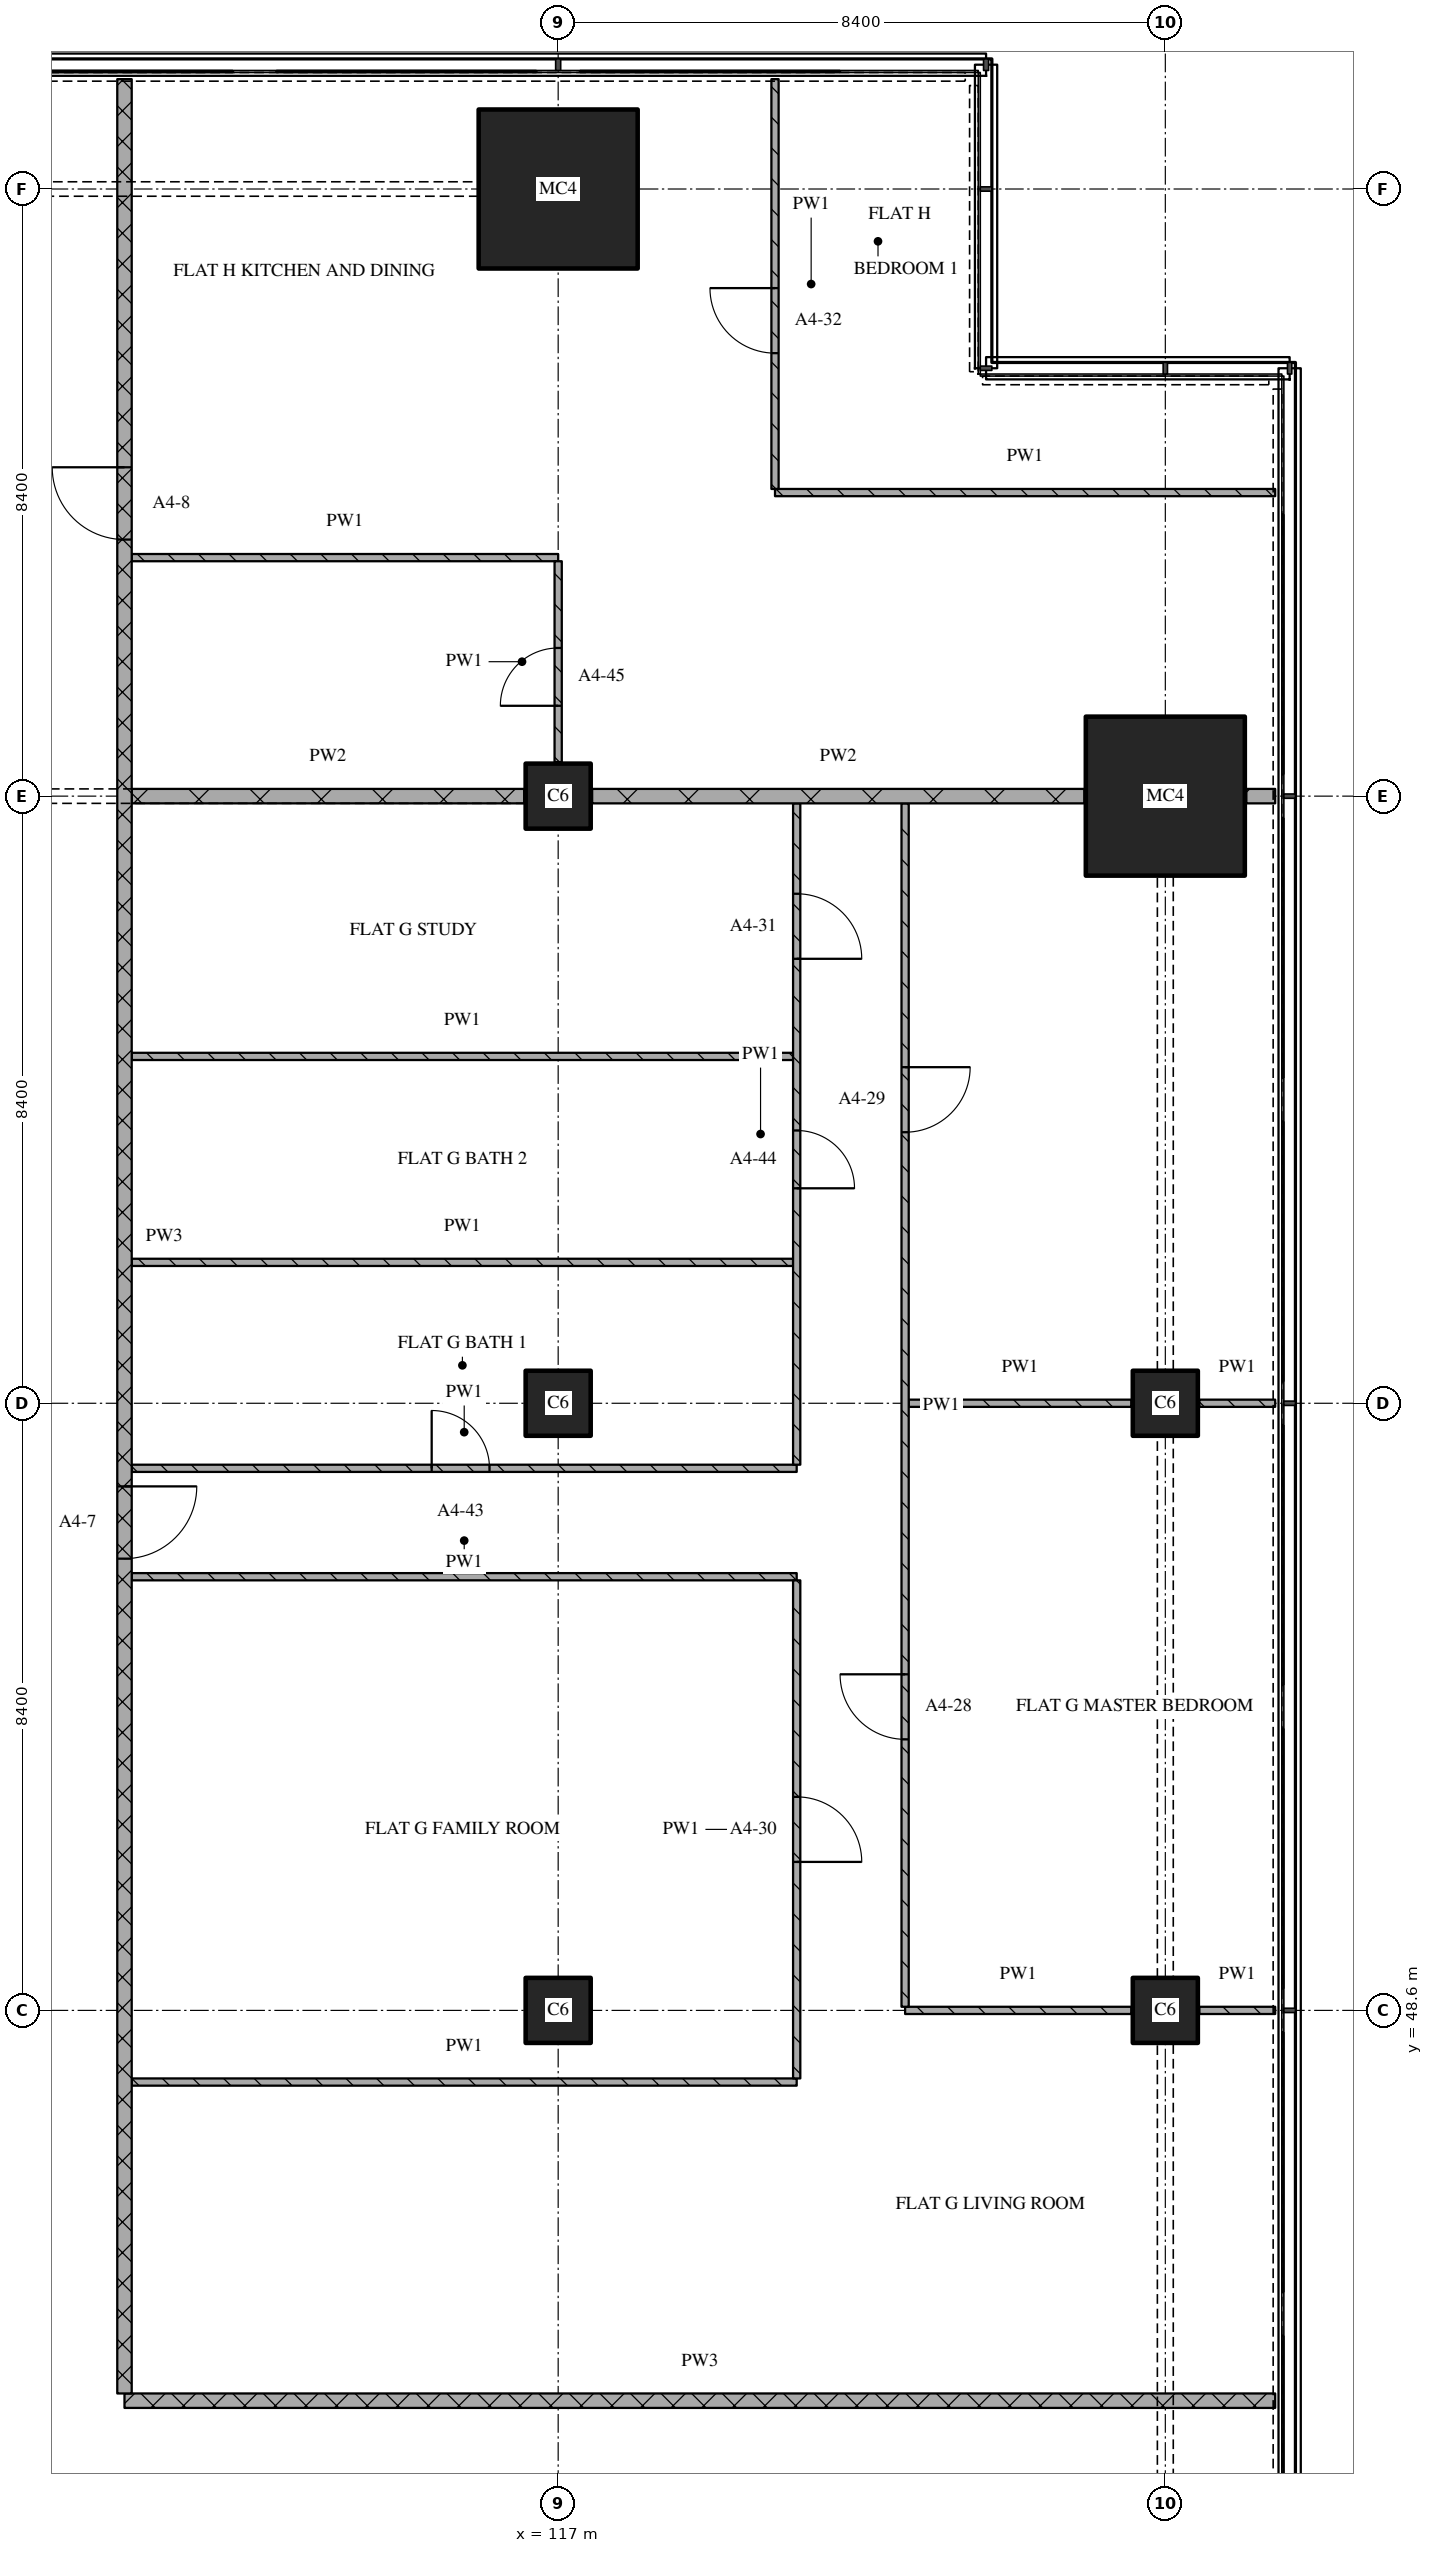
"""IFC4 building model, lengths in metres.
Left out: names, types, materials, properties, quantities, classifications, styles, units other than length and angle.
Written with IfcOpenShell. Run it as: python <this file> out.ifc"""

import sys

from ifc_helpers import new_model, si_unit, direction, frame, frame_2d, origin, origin_2d, place, context, subcontext, project, spatial, rectangle, extrude, element, fill, save


model = new_model("IFC4")
c1 = context("Model", 3, precision=1e-05, world=origin(), true_north=direction((0.0, 1.0)))
c2 = subcontext(c1, "Body", "Model", "MODEL_VIEW")
j1 = project(units=[si_unit("LENGTHUNIT", "METRE"), si_unit("PLANEANGLEUNIT", "RADIAN")], contexts=[c1])
p1 = place(None, origin())
s1 = spatial("IfcSite", under=j1, at=p1, CompositionType="ELEMENT")
p2 = place(p1, origin())
s2 = spatial("IfcBuilding", under=s1, at=p2, CompositionType="ELEMENT")
p3 = place(p2, frame((0.0, 0.0, 73.2)))
s3 = spatial("IfcBuildingStorey", under=s2, at=p3, CompositionType="ELEMENT", Elevation=73.2)
for number, where, z_axis, x_axis in (
    (1, (117.0, 48.6, 0.0), (0.0, 0.0, 1.0), (1.0, 0.0, 0.0)),
    (2, (117.0, 57.0, 0.0), (0.0, 0.0, 1.0), (1.0, 0.0, 0.0)),
    (3, (117.0, 65.4, 0.0), (0.0, 0.0, 1.0), (1.0, 0.0, 0.0)),
):
    element("IfcColumn", number, at=place(p3, frame(where, z_axis=z_axis, x_axis=x_axis)), inside=s3, PredefinedType="COLUMN", context=c2, shape_type="SweptSolid", body=[
        extrude(rectangle(XDim=0.9, YDim=0.9, at=origin_2d()), origin(), (0.0, 0.0, 1.0), 3.6),
    ])
p4 = place(p3, frame((117.0, 73.8, 0.0), z_axis=(0.0, 0.0, 1.0), x_axis=(1.0, 0.0, 0.0)))
e4 = element("IfcColumn", 4, at=p4, inside=s3, PredefinedType="COLUMN", context=c2, shape_type="SweptSolid", body=[
    extrude(rectangle(XDim=2.2, YDim=2.2, at=origin_2d()), origin(), (0.0, 0.0, 1.0), 3.6),
])
for number, where, z_axis, x_axis in (
    (5, (125.4, 48.6, 0.0), (0.0, 0.0, 1.0), (1.0, 0.0, 0.0)),
    (6, (125.4, 57.0, 0.0), (0.0, 0.0, 1.0), (1.0, 0.0, 0.0)),
):
    element("IfcColumn", number, at=place(p3, frame(where, z_axis=z_axis, x_axis=x_axis)), inside=s3, PredefinedType="COLUMN", context=c2, shape_type="SweptSolid", body=[
        extrude(rectangle(XDim=0.9, YDim=0.9, at=origin_2d()), origin(), (0.0, 0.0, 1.0), 3.6),
    ])
p5 = place(p3, frame((125.4, 65.4, 0.0), z_axis=(0.0, 0.0, 1.0), x_axis=(1.0, 0.0, 0.0)))
e7 = element("IfcColumn", 7, at=p5, inside=s3, PredefinedType="COLUMN", context=c2, shape_type="SweptSolid", body=[
    extrude(rectangle(XDim=2.2, YDim=2.2, at=origin_2d()), origin(), (0.0, 0.0, 1.0), 3.6),
])
p6 = place(p3, frame((111.0, 43.2, 0.0), z_axis=(0.0, 0.0, 1.0), x_axis=(1.0, 0.0, 0.0)))
e8 = element("IfcWall", 8, at=p6, inside=s3, PredefinedType="PARTITIONING", context=c2, shape_type="SweptSolid", body=[
    extrude(rectangle(XDim=15.92, YDim=0.2, at=frame_2d((7.96, 0.0))), origin(), (0.0, 0.0, 1.0), 3.32),
])
p7 = place(p3, frame((111.1, 47.609, 0.0), z_axis=(0.0, 0.0, 1.0), x_axis=(1.0, 0.0, 0.0)))
e9 = element("IfcWall", 9, at=p7, inside=s3, PredefinedType="PARTITIONING", context=c2, shape_type="SweptSolid", body=[
    extrude(rectangle(XDim=9.2, YDim=0.1, at=frame_2d((4.6, 0.0))), origin(), (0.0, 0.0, 1.0), 3.32),
])
p8 = place(p3, frame((121.8, 48.6, 0.0), z_axis=(0.0, 0.0, 1.0), x_axis=(1.0, 0.0, 0.0)))
e10 = element("IfcWall", 10, at=p8, inside=s3, PredefinedType="PARTITIONING", context=c2, shape_type="SweptSolid", body=[
    extrude(rectangle(XDim=3.13, YDim=0.1, at=frame_2d((1.565, 0.0))), origin(), (0.0, 0.0, 1.0), 3.32),
])
p9 = place(p3, frame((125.87, 48.6, 0.0), z_axis=(0.0, 0.0, 1.0), x_axis=(1.0, 0.0, 0.0)))
e11 = element("IfcWall", 11, at=p9, inside=s3, PredefinedType="PARTITIONING", context=c2, shape_type="SweptSolid", body=[
    extrude(rectangle(XDim=1.05, YDim=0.1, at=frame_2d((0.525, 0.0))), origin(), (0.0, 0.0, 1.0), 3.32),
])
p10 = place(p3, frame((111.1, 54.6, 0.0), z_axis=(0.0, 0.0, 1.0), x_axis=(1.0, 0.0, 0.0)))
e12 = element("IfcWall", 12, at=p10, inside=s3, PredefinedType="PARTITIONING", context=c2, shape_type="SweptSolid", body=[
    extrude(rectangle(XDim=9.2, YDim=0.1, at=frame_2d((4.6, 0.0))), origin(), (0.0, 0.0, 1.0), 3.32),
])
p11 = place(p3, frame((111.1, 56.1, 0.0), z_axis=(0.0, 0.0, 1.0), x_axis=(1.0, 0.0, 0.0)))
e13 = element("IfcWall", 13, at=p11, inside=s3, PredefinedType="PARTITIONING", context=c2, shape_type="SweptSolid", body=[
    extrude(rectangle(XDim=9.2, YDim=0.1, at=frame_2d((4.6, 0.0))), origin(), (0.0, 0.0, 1.0), 3.32),
])
p12 = place(p11, frame((4.15, 0.0, 0.0)))
e14 = element("IfcOpeningElement", 14, at=p12, cuts=e13, PredefinedType="OPENING", context=c2, shape_type="SweptSolid", body=[
    extrude(rectangle(XDim=0.8, YDim=2.1, at=frame_2d((0.4, 1.05))), frame((0.0, 0.06, 0.0), z_axis=(0.0, -1.0, 0.0), x_axis=(1.0, 0.0, 0.0)), (0.0, 0.0, 1.0), 0.12),
])
p13 = place(p3, frame((121.85, 57.0, 0.0), z_axis=(0.0, 0.0, 1.0), x_axis=(1.0, 0.0, 0.0)))
e15 = element("IfcWall", 15, at=p13, inside=s3, PredefinedType="PARTITIONING", context=c2, shape_type="SweptSolid", body=[
    extrude(rectangle(XDim=3.08, YDim=0.1, at=frame_2d((1.54, 0.0))), origin(), (0.0, 0.0, 1.0), 3.32),
])
p14 = place(p3, frame((125.87, 57.0, 0.0), z_axis=(0.0, 0.0, 1.0), x_axis=(1.0, 0.0, 0.0)))
e16 = element("IfcWall", 16, at=p14, inside=s3, PredefinedType="PARTITIONING", context=c2, shape_type="SweptSolid", body=[
    extrude(rectangle(XDim=1.05, YDim=0.1, at=frame_2d((0.525, 0.0))), origin(), (0.0, 0.0, 1.0), 3.32),
])
for number, where, z_axis, x_axis in (
    (17, (111.1, 58.949, 0.0), (0.0, 0.0, 1.0), (1.0, 0.0, 0.0)),
    (18, (111.1, 61.799, 0.0), (0.0, 0.0, 1.0), (1.0, 0.0, 0.0)),
):
    element("IfcWall", number, at=place(p3, frame(where, z_axis=z_axis, x_axis=x_axis)), inside=s3, PredefinedType="PARTITIONING", context=c2, shape_type="SweptSolid", body=[
        extrude(rectangle(XDim=9.15, YDim=0.1, at=frame_2d((4.575, 0.0))), origin(), (0.0, 0.0, 1.0), 3.32),
    ])
p15 = place(p3, frame((111.1, 65.4, 0.0), z_axis=(0.0, 0.0, 1.0), x_axis=(1.0, 0.0, 0.0)))
e19 = element("IfcWall", 19, at=p15, inside=s3, PredefinedType="PARTITIONING", context=c2, shape_type="SweptSolid", body=[
    extrude(rectangle(XDim=5.43, YDim=0.2, at=frame_2d((2.715, 0.0))), origin(), (0.0, 0.0, 1.0), 2.82),
])
p16 = place(p3, frame((117.47, 65.4, 0.0), z_axis=(0.0, 0.0, 1.0), x_axis=(1.0, 0.0, 0.0)))
e20 = element("IfcWall", 20, at=p16, inside=s3, PredefinedType="PARTITIONING", context=c2, shape_type="SweptSolid", body=[
    extrude(rectangle(XDim=6.81, YDim=0.2, at=frame_2d((3.405, 0.0))), origin(), (0.0, 0.0, 1.0), 3.32),
])
p17 = place(p3, frame((126.52, 65.4, 0.0), z_axis=(0.0, 0.0, 1.0), x_axis=(1.0, 0.0, 0.0)))
e21 = element("IfcWall", 21, at=p17, inside=s3, PredefinedType="PARTITIONING", context=c2, shape_type="SweptSolid", body=[
    extrude(rectangle(XDim=0.4, YDim=0.2, at=frame_2d((0.2, 0.0))), origin(), (0.0, 0.0, 1.0), 3.32),
])
p18 = place(p3, frame((111.1, 68.7, 0.0), z_axis=(0.0, 0.0, 1.0), x_axis=(1.0, 0.0, 0.0)))
e22 = element("IfcWall", 22, at=p18, inside=s3, PredefinedType="PARTITIONING", context=c2, shape_type="SweptSolid", body=[
    extrude(rectangle(XDim=5.9, YDim=0.1, at=frame_2d((2.95, 0.0))), origin(), (0.0, 0.0, 1.0), 3.32),
])
p19 = place(p3, frame((120.0, 69.6, 0.0), z_axis=(0.0, 0.0, 1.0), x_axis=(1.0, 0.0, 0.0)))
e23 = element("IfcWall", 23, at=p19, inside=s3, PredefinedType="PARTITIONING", context=c2, shape_type="SweptSolid", body=[
    extrude(rectangle(XDim=6.92, YDim=0.1, at=frame_2d((3.46, 0.0))), origin(), (0.0, 0.0, 1.0), 3.32),
])
p20 = place(p3, frame((111.0, 75.32, 0.0), z_axis=(0.0, 0.0, 1.0), x_axis=(0.0, -1.0, 0.0)))
e24 = element("IfcWall", 24, at=p20, inside=s3, PredefinedType="PARTITIONING", context=c2, shape_type="SweptSolid", body=[
    extrude(rectangle(XDim=32.02, YDim=0.2, at=frame_2d((16.01, 0.0))), origin(), (0.0, 0.0, 1.0), 3.32),
])
p21 = place(p20, frame((5.37, 0.0, 0.0)))
e25 = element("IfcOpeningElement", 25, at=p21, cuts=e24, PredefinedType="OPENING", context=c2, shape_type="SweptSolid", body=[
    extrude(rectangle(XDim=1.0, YDim=2.1, at=frame_2d((0.5, 1.05))), frame((0.0, 0.11, 0.0), z_axis=(0.0, -1.0, 0.0), x_axis=(1.0, 0.0, 0.0)), (0.0, 0.0, 1.0), 0.22),
])
p22 = place(p20, frame((19.47, 0.0, 0.0)))
e26 = element("IfcOpeningElement", 26, at=p22, cuts=e24, PredefinedType="OPENING", context=c2, shape_type="SweptSolid", body=[
    extrude(rectangle(XDim=1.0, YDim=2.1, at=frame_2d((0.5, 1.05))), frame((0.0, 0.11, 0.0), z_axis=(0.0, -1.0, 0.0), x_axis=(1.0, 0.0, 0.0)), (0.0, 0.0, 1.0), 0.22),
])
p23 = place(p3, frame((117.0, 65.87, 0.0), z_axis=(0.0, 0.0, 1.0), x_axis=(0.0, 1.0, 0.0)))
e27 = element("IfcWall", 27, at=p23, inside=s3, PredefinedType="PARTITIONING", context=c2, shape_type="SweptSolid", body=[
    extrude(rectangle(XDim=2.78, YDim=0.1, at=frame_2d((1.39, 0.0))), origin(), (0.0, 0.0, 1.0), 3.32),
])
p24 = place(p23, frame((0.78, 0.0, 0.0)))
e28 = element("IfcOpeningElement", 28, at=p24, cuts=e27, PredefinedType="OPENING", context=c2, shape_type="SweptSolid", body=[
    extrude(rectangle(XDim=0.8, YDim=2.1, at=frame_2d((0.4, 1.05))), frame((0.0, 0.06, 0.0), z_axis=(0.0, -1.0, 0.0), x_axis=(1.0, 0.0, 0.0)), (0.0, 0.0, 1.0), 0.12),
])
p25 = place(p3, frame((120.0, 75.32, 0.0), z_axis=(0.0, 0.0, 1.0), x_axis=(0.0, -1.0, 0.0)))
e29 = element("IfcWall", 29, at=p25, inside=s3, PredefinedType="PARTITIONING", context=c2, shape_type="SweptSolid", body=[
    extrude(rectangle(XDim=5.67, YDim=0.1, at=frame_2d((2.835, 0.0))), origin(), (0.0, 0.0, 1.0), 3.32),
])
p26 = place(p25, frame((2.891, 0.0, 0.0)))
e30 = element("IfcOpeningElement", 30, at=p26, cuts=e29, PredefinedType="OPENING", context=c2, shape_type="SweptSolid", body=[
    extrude(rectangle(XDim=0.9, YDim=2.1, at=frame_2d((0.45, 1.05))), frame((0.0, 0.06, 0.0), z_axis=(0.0, -1.0, 0.0), x_axis=(1.0, 0.0, 0.0)), (0.0, 0.0, 1.0), 0.12),
])
p27 = place(p3, frame((120.3, 47.659, 0.0), z_axis=(0.0, 0.0, 1.0), x_axis=(0.0, 1.0, 0.0)))
e31 = element("IfcWall", 31, at=p27, inside=s3, PredefinedType="PARTITIONING", context=c2, shape_type="SweptSolid", body=[
    extrude(rectangle(XDim=6.891, YDim=0.1, at=frame_2d((3.446, 0.0))), origin(), (0.0, 0.0, 1.0), 3.32),
])
p28 = place(p27, frame((2.996, 0.0, 0.0)))
e32 = element("IfcOpeningElement", 32, at=p28, cuts=e31, PredefinedType="OPENING", context=c2, shape_type="SweptSolid", body=[
    extrude(rectangle(XDim=0.9, YDim=2.1, at=frame_2d((0.45, 1.05))), frame((0.0, 0.06, 0.0), z_axis=(0.0, -1.0, 0.0), x_axis=(1.0, 0.0, 0.0)), (0.0, 0.0, 1.0), 0.12),
])
p29 = place(p3, frame((120.3, 56.15, 0.0), z_axis=(0.0, 0.0, 1.0), x_axis=(0.0, 1.0, 0.0)))
e33 = element("IfcWall", 33, at=p29, inside=s3, PredefinedType="PARTITIONING", context=c2, shape_type="SweptSolid", body=[
    extrude(rectangle(XDim=9.15, YDim=0.1, at=frame_2d((4.575, 0.0))), origin(), (0.0, 0.0, 1.0), 3.32),
])
p30 = place(p29, frame((3.824, 0.0, 0.0)))
e34 = element("IfcOpeningElement", 34, at=p30, cuts=e33, PredefinedType="OPENING", context=c2, shape_type="SweptSolid", body=[
    extrude(rectangle(XDim=0.8, YDim=2.1, at=frame_2d((0.4, 1.05))), frame((0.0, 0.06, 0.0), z_axis=(0.0, -1.0, 0.0), x_axis=(1.0, 0.0, 0.0)), (0.0, 0.0, 1.0), 0.12),
])
p31 = place(p29, frame((7.0, 0.0, 0.0)))
e35 = element("IfcOpeningElement", 35, at=p31, cuts=e33, PredefinedType="OPENING", context=c2, shape_type="SweptSolid", body=[
    extrude(rectangle(XDim=0.9, YDim=2.1, at=frame_2d((0.45, 1.05))), frame((0.0, 0.06, 0.0), z_axis=(0.0, -1.0, 0.0), x_axis=(1.0, 0.0, 0.0)), (0.0, 0.0, 1.0), 0.12),
])
p32 = place(p3, frame((121.8, 65.3, 0.0), z_axis=(0.0, 0.0, 1.0), x_axis=(0.0, -1.0, 0.0)))
e36 = element("IfcWall", 36, at=p32, inside=s3, PredefinedType="PARTITIONING", context=c2, shape_type="SweptSolid", body=[
    extrude(rectangle(XDim=16.65, YDim=0.1, at=frame_2d((8.325, 0.0))), origin(), (0.0, 0.0, 1.0), 3.32),
])
p33 = place(p32, frame((3.65, 0.0, 0.0)))
e37 = element("IfcOpeningElement", 37, at=p33, cuts=e36, PredefinedType="OPENING", context=c2, shape_type="SweptSolid", body=[
    extrude(rectangle(XDim=0.9, YDim=2.1, at=frame_2d((0.45, 1.05))), frame((0.0, 0.06, 0.0), z_axis=(0.0, -1.0, 0.0), x_axis=(1.0, 0.0, 0.0)), (0.0, 0.0, 1.0), 0.12),
])
p34 = place(p32, frame((12.05, 0.0, 0.0)))
e38 = element("IfcOpeningElement", 38, at=p34, cuts=e36, PredefinedType="OPENING", context=c2, shape_type="SweptSolid", body=[
    extrude(rectangle(XDim=0.9, YDim=2.1, at=frame_2d((0.45, 1.05))), frame((0.0, 0.06, 0.0), z_axis=(0.0, -1.0, 0.0), x_axis=(1.0, 0.0, 0.0)), (0.0, 0.0, 1.0), 0.12),
])
p35 = place(p12, origin())
e39 = element("IfcDoor", 39, at=p35, inside=s3, OperationType="SINGLE_SWING_LEFT", PredefinedType="DOOR", context=c2, shape_type="SweptSolid", body=[
    extrude(rectangle(XDim=0.8, YDim=2.1, at=frame_2d((0.4, 1.05))), frame((0.0, 0.025, 0.0), z_axis=(0.0, -1.0, 0.0), x_axis=(1.0, 0.0, 0.0)), (0.0, 0.0, 1.0), 0.05),
])
fill(e14, e39)
p36 = place(p21, origin())
e40 = element("IfcDoor", 40, at=p36, inside=s3, OperationType="SINGLE_SWING_RIGHT", PredefinedType="DOOR", context=c2, shape_type="SweptSolid", body=[
    extrude(rectangle(XDim=1.0, YDim=2.1, at=frame_2d((0.5, 1.05))), frame((0.0, 0.025, 0.0), z_axis=(0.0, -1.0, 0.0), x_axis=(1.0, 0.0, 0.0)), (0.0, 0.0, 1.0), 0.05),
])
fill(e25, e40)
p37 = place(p22, origin())
e41 = element("IfcDoor", 41, at=p37, inside=s3, OperationType="SINGLE_SWING_LEFT", PredefinedType="DOOR", context=c2, shape_type="SweptSolid", body=[
    extrude(rectangle(XDim=1.0, YDim=2.1, at=frame_2d((0.5, 1.05))), frame((0.0, 0.025, 0.0), z_axis=(0.0, -1.0, 0.0), x_axis=(1.0, 0.0, 0.0)), (0.0, 0.0, 1.0), 0.05),
])
fill(e26, e41)
p38 = place(p24, origin())
e42 = element("IfcDoor", 42, at=p38, inside=s3, OperationType="SINGLE_SWING_LEFT", PredefinedType="DOOR", context=c2, shape_type="SweptSolid", body=[
    extrude(rectangle(XDim=0.8, YDim=2.1, at=frame_2d((0.4, 1.05))), frame((0.0, 0.025, 0.0), z_axis=(0.0, -1.0, 0.0), x_axis=(1.0, 0.0, 0.0)), (0.0, 0.0, 1.0), 0.05),
])
fill(e28, e42)
p39 = place(p26, origin())
e43 = element("IfcDoor", 43, at=p39, inside=s3, OperationType="SINGLE_SWING_RIGHT", PredefinedType="DOOR", context=c2, shape_type="SweptSolid", body=[
    extrude(rectangle(XDim=0.9, YDim=2.1, at=frame_2d((0.45, 1.05))), frame((0.0, 0.025, 0.0), z_axis=(0.0, -1.0, 0.0), x_axis=(1.0, 0.0, 0.0)), (0.0, 0.0, 1.0), 0.05),
])
fill(e30, e43)
p40 = place(p28, origin())
e44 = element("IfcDoor", 44, at=p40, inside=s3, OperationType="SINGLE_SWING_RIGHT", PredefinedType="DOOR", context=c2, shape_type="SweptSolid", body=[
    extrude(rectangle(XDim=0.9, YDim=2.1, at=frame_2d((0.45, 1.05))), frame((0.0, 0.025, 0.0), z_axis=(0.0, -1.0, 0.0), x_axis=(1.0, 0.0, 0.0)), (0.0, 0.0, 1.0), 0.05),
])
fill(e32, e44)
p41 = place(p30, origin())
e45 = element("IfcDoor", 45, at=p41, inside=s3, OperationType="SINGLE_SWING_RIGHT", PredefinedType="DOOR", context=c2, shape_type="SweptSolid", body=[
    extrude(rectangle(XDim=0.8, YDim=2.1, at=frame_2d((0.4, 1.05))), frame((0.0, 0.025, 0.0), z_axis=(0.0, -1.0, 0.0), x_axis=(1.0, 0.0, 0.0)), (0.0, 0.0, 1.0), 0.05),
])
fill(e34, e45)
p42 = place(p31, origin())
e46 = element("IfcDoor", 46, at=p42, inside=s3, OperationType="SINGLE_SWING_RIGHT", PredefinedType="DOOR", context=c2, shape_type="SweptSolid", body=[
    extrude(rectangle(XDim=0.9, YDim=2.1, at=frame_2d((0.45, 1.05))), frame((0.0, 0.025, 0.0), z_axis=(0.0, -1.0, 0.0), x_axis=(1.0, 0.0, 0.0)), (0.0, 0.0, 1.0), 0.05),
])
fill(e35, e46)
p43 = place(p33, origin())
e47 = element("IfcDoor", 47, at=p43, inside=s3, OperationType="SINGLE_SWING_LEFT", PredefinedType="DOOR", context=c2, shape_type="SweptSolid", body=[
    extrude(rectangle(XDim=0.9, YDim=2.1, at=frame_2d((0.45, 1.05))), frame((0.0, 0.025, 0.0), z_axis=(0.0, -1.0, 0.0), x_axis=(1.0, 0.0, 0.0)), (0.0, 0.0, 1.0), 0.05),
])
fill(e37, e47)
p44 = place(p34, origin())
e48 = element("IfcDoor", 48, at=p44, inside=s3, OperationType="SINGLE_SWING_RIGHT", PredefinedType="DOOR", context=c2, shape_type="SweptSolid", body=[
    extrude(rectangle(XDim=0.9, YDim=2.1, at=frame_2d((0.45, 1.05))), frame((0.0, 0.025, 0.0), z_axis=(0.0, -1.0, 0.0), x_axis=(1.0, 0.0, 0.0)), (0.0, 0.0, 1.0), 0.05),
])
fill(e38, e48)
save(model, sys.argv[1])
